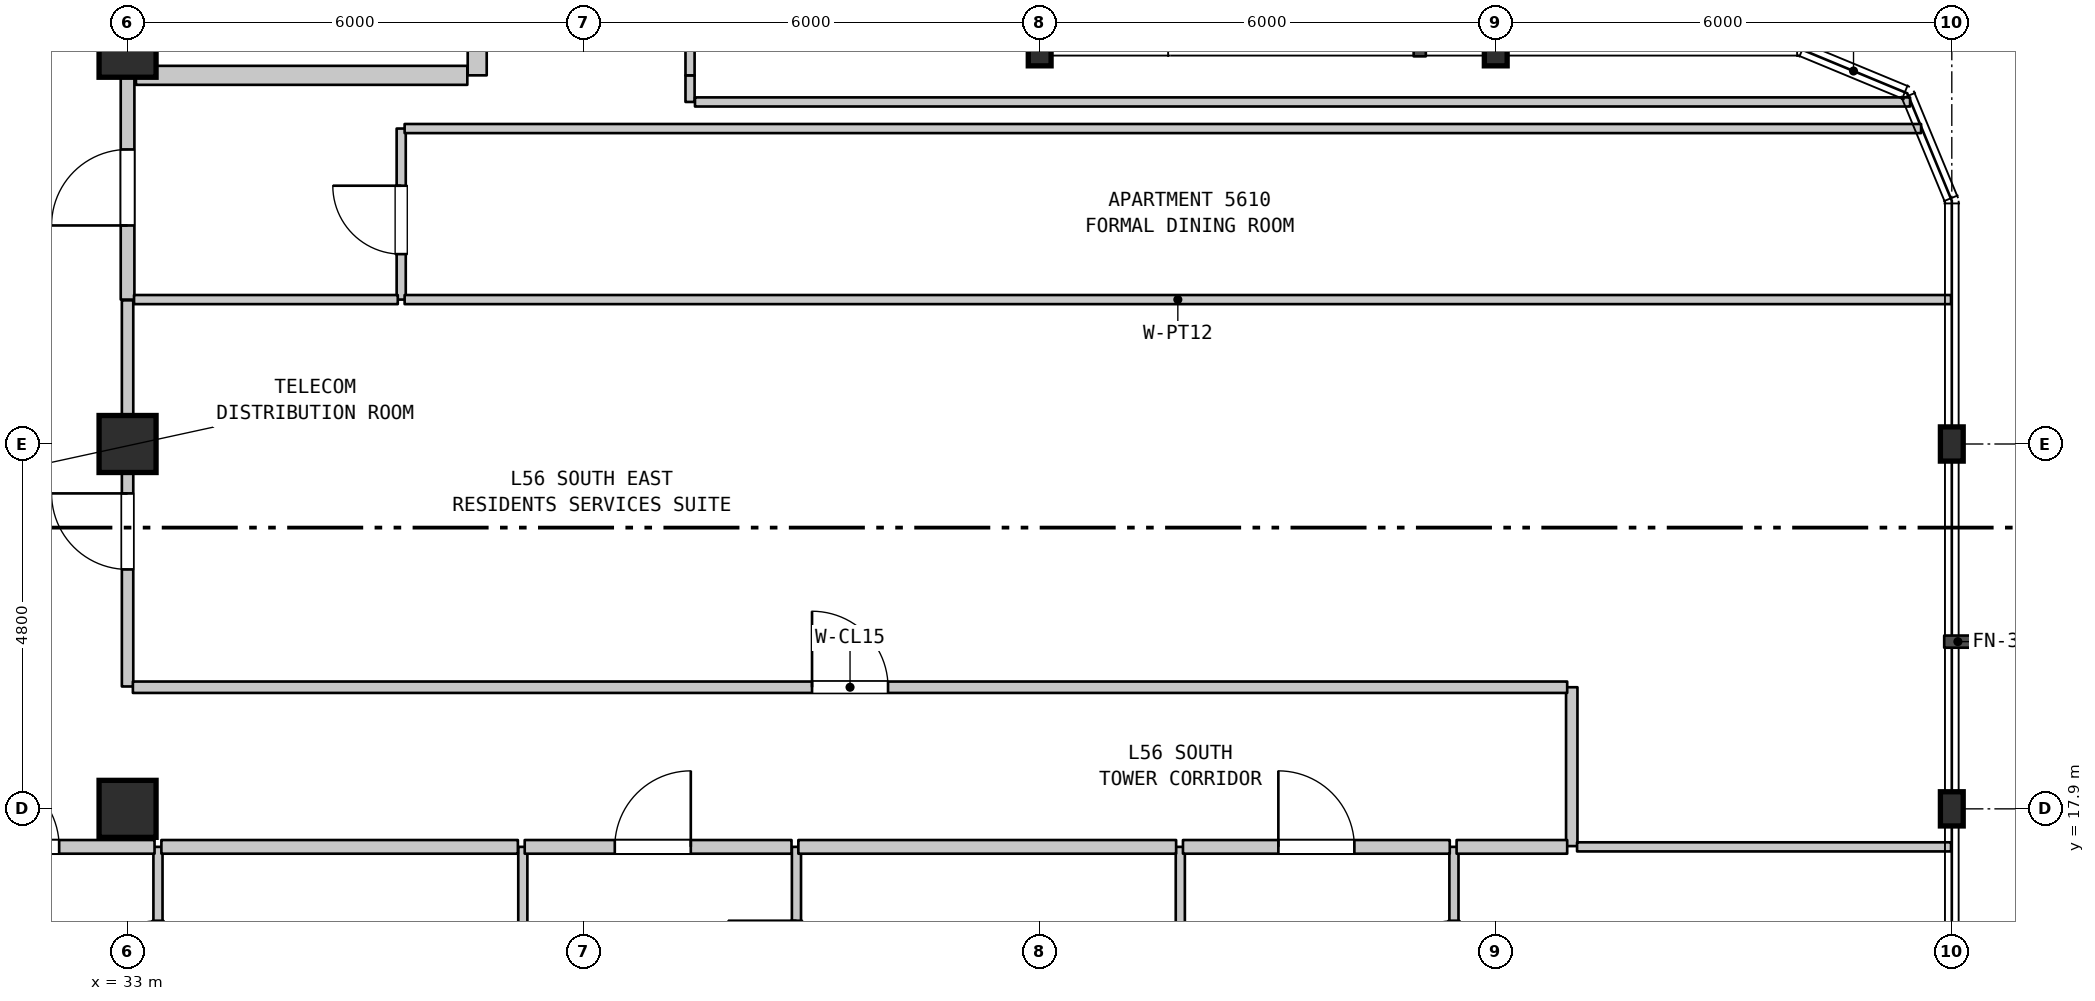
"""IFC4 building model, lengths in metres.
Left out: names, types, materials, properties, quantities, classifications, styles, units other than length and angle.
Written with IfcOpenShell. Run it as: python <this file> out.ifc"""

import sys

from ifc_helpers import new_model, si_unit, direction, frame, frame_2d, origin, origin_2d, place, context, subcontext, project, spatial, rectangle, i_section, extrude, element, fill, save


model = new_model("IFC4")
c1 = context("Model", 3, precision=1e-05, world=origin(), true_north=direction((0.0, 1.0)))
c2 = subcontext(c1, "Body", "Model", "MODEL_VIEW")
j1 = project(units=[si_unit("LENGTHUNIT", "METRE"), si_unit("PLANEANGLEUNIT", "RADIAN")], contexts=[c1])
p1 = place(None, origin())
s1 = spatial("IfcSite", under=j1, at=p1, CompositionType="ELEMENT")
p2 = place(p1, origin())
s2 = spatial("IfcBuilding", under=s1, at=p2, CompositionType="ELEMENT")
p3 = place(p2, frame((0.0, 0.0, 226.5)))
s3 = spatial("IfcBuildingStorey", under=s2, at=p3, CompositionType="ELEMENT", Elevation=226.5)
for number, where, z_axis, x_axis in (
    (1, (33.0, 17.9, 0.0), (0.0, 0.0, 1.0), (1.0, 0.0, 0.0)),
    (2, (33.0, 22.7, 0.0), (0.0, 0.0, 1.0), (1.0, 0.0, 0.0)),
    (3, (33.0, 27.9, 0.0), (0.0, 0.0, 1.0), (1.0, 0.0, 0.0)),
):
    element("IfcColumn", number, at=place(p3, frame(where, z_axis=z_axis, x_axis=x_axis)), inside=s3, PredefinedType="COLUMN", context=c2, shape_type="SweptSolid", body=[
        extrude(rectangle(XDim=0.75, YDim=0.75, at=origin_2d()), origin(), (0.0, 0.0, 1.0), 3.7),
    ])
for number, where, z_axis, x_axis in (
    (4, (45.0, 27.9, 0.0), (0.0, 0.0, 1.0), (1.0, 0.0, 0.0)),
    (5, (51.0, 27.9, 0.0), (0.0, 0.0, 1.0), (1.0, 0.0, 0.0)),
    (6, (57.0, 17.9, 0.0), (0.0, 0.0, 1.0), (1.0, 0.0, 0.0)),
    (7, (57.0, 22.7, 0.0), (0.0, 0.0, 1.0), (1.0, 0.0, 0.0)),
):
    element("IfcColumn", number, at=place(p3, frame(where, z_axis=z_axis, x_axis=x_axis)), inside=s3, PredefinedType="COLUMN", context=c2, shape_type="SweptSolid", body=[
        extrude(i_section(OverallWidth=0.3, OverallDepth=0.45, WebThickness=0.014, FlangeThickness=0.026, FilletRadius=0.027, at=origin_2d()), origin(), (0.0, 0.0, 1.0), 3.7),
    ])
p4 = place(p3, frame((33.0, 19.51, 0.0), z_axis=(0.0, 0.0, 1.0), x_axis=(0.0, 1.0, 0.0)))
e8 = element("IfcWall", 8, at=p4, inside=s3, PredefinedType="STANDARD", context=c2, shape_type="SweptSolid", body=[
    extrude(rectangle(XDim=5.08, YDim=0.15, at=frame_2d((2.54, 0.0))), origin(), (0.0, 0.0, 1.0), 2.99),
])
p5 = place(p4, frame((1.54, 0.0, 0.0)))
e9 = element("IfcOpeningElement", 9, at=p5, cuts=e8, PredefinedType="OPENING", context=c2, shape_type="SweptSolid", body=[
    extrude(rectangle(XDim=1.0, YDim=2.15, at=frame_2d((0.5, 1.075))), frame((0.0, 0.085, 0.0), z_axis=(0.0, -1.0, 0.0), x_axis=(1.0, 0.0, 0.0)), (0.0, 0.0, 1.0), 0.17),
])
p6 = place(p3, frame((33.0, 24.6, 0.0), z_axis=(0.0, 0.0, 1.0), x_axis=(0.0, 1.0, 0.0)))
e10 = element("IfcWall", 10, at=p6, inside=s3, PredefinedType="STANDARD", context=c2, shape_type="SweptSolid", body=[
    extrude(rectangle(XDim=2.95, YDim=0.18, at=frame_2d((1.475, 0.0))), origin(), (0.0, 0.0, 1.0), 2.99),
])
p7 = place(p6, frame((0.975, 0.0, 0.0)))
e11 = element("IfcOpeningElement", 11, at=p7, cuts=e10, PredefinedType="OPENING", context=c2, shape_type="SweptSolid", body=[
    extrude(rectangle(XDim=1.0, YDim=2.15, at=frame_2d((0.5, 1.075))), frame((0.0, 0.1, 0.0), z_axis=(0.0, -1.0, 0.0), x_axis=(1.0, 0.0, 0.0)), (0.0, 0.0, 1.0), 0.2),
])
p8 = place(p3, frame((33.0, 27.55, 0.0), z_axis=(0.0, 0.0, 1.0), x_axis=(0.0, 1.0, 0.0)))
e12 = element("IfcWall", 12, at=p8, inside=s3, PredefinedType="STANDARD", context=c2, shape_type="SweptSolid", body=[
    extrude(rectangle(XDim=4.636, YDim=0.25, at=frame_2d((2.318, 0.0))), origin(), (0.0, 0.0, 1.0), 2.89),
])
p9 = place(p3, frame((33.4, 14.7, 0.0), z_axis=(0.0, 0.0, 1.0), x_axis=(0.0, 1.0, 0.0)))
e13 = element("IfcWall", 13, at=p9, inside=s3, PredefinedType="PARTITIONING", context=c2, shape_type="SweptSolid", body=[
    extrude(rectangle(XDim=2.7, YDim=0.12, at=frame_2d((1.35, 0.0))), origin(), (0.0, 0.0, 1.0), 3.39),
])
p10 = place(p9, frame((0.828, 0.0, 0.0)))
e14 = element("IfcOpeningElement", 14, at=p10, cuts=e13, PredefinedType="OPENING", context=c2, shape_type="SweptSolid", body=[
    extrude(rectangle(XDim=0.9, YDim=2.1, at=frame_2d((0.45, 1.05))), frame((0.0, 0.07, 0.0), z_axis=(0.0, -1.0, 0.0), x_axis=(1.0, 0.0, 0.0)), (0.0, 0.0, 1.0), 0.14),
])
p11 = place(p3, frame((36.6, 24.6, 0.0), z_axis=(0.0, 0.0, 1.0), x_axis=(0.0, 1.0, 0.0)))
e15 = element("IfcWall", 15, at=p11, inside=s3, PredefinedType="PARTITIONING", context=c2, shape_type="SweptSolid", body=[
    extrude(rectangle(XDim=2.25, YDim=0.12, at=frame_2d((1.125, 0.0))), origin(), (0.0, 0.0, 1.0), 3.39),
])
p12 = place(p11, frame((0.598, 0.0, 0.0)))
e16 = element("IfcOpeningElement", 16, at=p12, cuts=e15, PredefinedType="OPENING", context=c2, shape_type="SweptSolid", body=[
    extrude(rectangle(XDim=0.9, YDim=2.15, at=frame_2d((0.45, 1.075))), frame((0.0, 0.07, 0.0), z_axis=(0.0, -1.0, 0.0), x_axis=(1.0, 0.0, 0.0)), (0.0, 0.0, 1.0), 0.14),
])
p13 = place(p3, frame((37.6, 27.55, 0.0), z_axis=(0.0, 0.0, 1.0), x_axis=(0.0, 1.0, 0.0)))
e17 = element("IfcWall", 17, at=p13, inside=s3, PredefinedType="STANDARD", context=c2, shape_type="SweptSolid", body=[
    extrude(rectangle(XDim=4.636, YDim=0.25, at=frame_2d((2.318, 0.0))), origin(), (0.0, 0.0, 1.0), 3.39),
])
p14 = place(p13, frame((1.843, 0.0, 0.0)))
e18 = element("IfcOpeningElement", 18, at=p14, cuts=e17, PredefinedType="OPENING", context=c2, shape_type="SweptSolid", body=[
    extrude(rectangle(XDim=0.95, YDim=2.15, at=frame_2d((0.475, 1.075))), frame((0.0, 0.135, 0.0), z_axis=(0.0, -1.0, 0.0), x_axis=(1.0, 0.0, 0.0)), (0.0, 0.0, 1.0), 0.27),
])
p15 = place(p3, frame((38.2, 14.7, 0.0), z_axis=(0.0, 0.0, 1.0), x_axis=(0.0, 1.0, 0.0)))
e19 = element("IfcWall", 19, at=p15, inside=s3, PredefinedType="PARTITIONING", context=c2, shape_type="SweptSolid", body=[
    extrude(rectangle(XDim=2.7, YDim=0.12, at=frame_2d((1.35, 0.0))), origin(), (0.0, 0.0, 1.0), 3.39),
])
p16 = place(p3, frame((40.4, 27.2, 0.0), z_axis=(0.0, 0.0, 1.0), x_axis=(0.0, 1.0, 0.0)))
e20 = element("IfcWall", 20, at=p16, inside=s3, PredefinedType="PARTITIONING", context=c2, shape_type="SweptSolid", body=[
    extrude(rectangle(XDim=0.35, YDim=0.12, at=frame_2d((0.175, 0.0))), origin(), (0.0, 0.0, 1.0), 3.39),
])
p17 = place(p3, frame((40.4, 27.55, 0.0), z_axis=(0.0, 0.0, 1.0), x_axis=(0.0, 1.0, 0.0)))
e21 = element("IfcWall", 21, at=p17, inside=s3, PredefinedType="PARTITIONING", context=c2, shape_type="SweptSolid", body=[
    extrude(rectangle(XDim=12.2, YDim=0.12, at=frame_2d((6.1, 0.0))), origin(), (0.0, 0.0, 1.0), 3.39),
])
p18 = place(p17, frame((1.758, 0.0, 0.0)))
e22 = element("IfcOpeningElement", 22, at=p18, cuts=e21, PredefinedType="OPENING", context=c2, shape_type="SweptSolid", body=[
    extrude(rectangle(XDim=0.9, YDim=2.15, at=frame_2d((0.45, 1.075))), frame((0.0, 0.07, 0.0), z_axis=(0.0, -1.0, 0.0), x_axis=(1.0, 0.0, 0.0)), (0.0, 0.0, 1.0), 0.14),
])
p19 = place(p17, frame((5.579, 0.0, 0.0)))
e23 = element("IfcOpeningElement", 23, at=p19, cuts=e21, PredefinedType="OPENING", context=c2, shape_type="SweptSolid", body=[
    extrude(rectangle(XDim=0.9, YDim=2.15, at=frame_2d((0.45, 1.075))), frame((0.0, 0.07, 0.0), z_axis=(0.0, -1.0, 0.0), x_axis=(1.0, 0.0, 0.0)), (0.0, 0.0, 1.0), 0.14),
])
p20 = place(p17, frame((9.541, 0.0, 0.0)))
e24 = element("IfcOpeningElement", 24, at=p20, cuts=e21, PredefinedType="OPENING", context=c2, shape_type="SweptSolid", body=[
    extrude(rectangle(XDim=0.9, YDim=2.15, at=frame_2d((0.45, 1.075))), frame((0.0, 0.07, 0.0), z_axis=(0.0, -1.0, 0.0), x_axis=(1.0, 0.0, 0.0)), (0.0, 0.0, 1.0), 0.14),
])
p21 = place(p3, frame((41.8, 14.7, 0.0), z_axis=(0.0, 0.0, 1.0), x_axis=(0.0, 1.0, 0.0)))
e25 = element("IfcWall", 25, at=p21, inside=s3, PredefinedType="PARTITIONING", context=c2, shape_type="SweptSolid", body=[
    extrude(rectangle(XDim=2.7, YDim=0.12, at=frame_2d((1.35, 0.0))), origin(), (0.0, 0.0, 1.0), 3.39),
])
p22 = place(p21, frame((0.828, 0.0, 0.0)))
e26 = element("IfcOpeningElement", 26, at=p22, cuts=e25, PredefinedType="OPENING", context=c2, shape_type="SweptSolid", body=[
    extrude(rectangle(XDim=0.9, YDim=2.1, at=frame_2d((0.45, 1.05))), frame((0.0, 0.07, 0.0), z_axis=(0.0, -1.0, 0.0), x_axis=(1.0, 0.0, 0.0)), (0.0, 0.0, 1.0), 0.14),
])
p23 = place(p3, frame((46.85, 14.7, 0.0), z_axis=(0.0, 0.0, 1.0), x_axis=(0.0, 1.0, 0.0)))
e27 = element("IfcWall", 27, at=p23, inside=s3, PredefinedType="PARTITIONING", context=c2, shape_type="SweptSolid", body=[
    extrude(rectangle(XDim=2.7, YDim=0.12, at=frame_2d((1.35, 0.0))), origin(), (0.0, 0.0, 1.0), 3.39),
])
p24 = place(p3, frame((50.45, 14.7, 0.0), z_axis=(0.0, 0.0, 1.0), x_axis=(0.0, 1.0, 0.0)))
e28 = element("IfcWall", 28, at=p24, inside=s3, PredefinedType="PARTITIONING", context=c2, shape_type="SweptSolid", body=[
    extrude(rectangle(XDim=2.7, YDim=0.12, at=frame_2d((1.35, 0.0))), origin(), (0.0, 0.0, 1.0), 3.39),
])
p25 = place(p24, frame((0.828, 0.0, 0.0)))
e29 = element("IfcOpeningElement", 29, at=p25, cuts=e28, PredefinedType="OPENING", context=c2, shape_type="SweptSolid", body=[
    extrude(rectangle(XDim=0.9, YDim=2.1, at=frame_2d((0.45, 1.05))), frame((0.0, 0.07, 0.0), z_axis=(0.0, -1.0, 0.0), x_axis=(1.0, 0.0, 0.0)), (0.0, 0.0, 1.0), 0.14),
])
p26 = place(p3, frame((52.0, 17.41, 0.0), z_axis=(0.0, 0.0, 1.0), x_axis=(0.0, 1.0, 0.0)))
e30 = element("IfcWall", 30, at=p26, inside=s3, PredefinedType="STANDARD", context=c2, shape_type="SweptSolid", body=[
    extrude(rectangle(XDim=2.09, YDim=0.15, at=frame_2d((1.045, 0.0))), origin(), (0.0, 0.0, 1.0), 3.39),
])
p27 = place(p3, frame((29.845, 17.4, 0.0), z_axis=(0.0, 0.0, 1.0), x_axis=(1.0, 0.0, 0.0)))
e31 = element("IfcWall", 31, at=p27, inside=s3, PredefinedType="STANDARD", context=c2, shape_type="SweptSolid", body=[
    extrude(rectangle(XDim=3.51, YDim=0.18, at=frame_2d((1.755, 0.0))), origin(), (0.0, 0.0, 1.0), 3.39),
])
p28 = place(p27, frame((1.255, 0.0, 0.0)))
e32 = element("IfcOpeningElement", 32, at=p28, cuts=e31, PredefinedType="OPENING", context=c2, shape_type="SweptSolid", body=[
    extrude(rectangle(XDim=1.0, YDim=2.15, at=frame_2d((0.5, 1.075))), frame((0.0, 0.1, 0.0), z_axis=(0.0, -1.0, 0.0), x_axis=(1.0, 0.0, 0.0)), (0.0, 0.0, 1.0), 0.2),
])
p29 = place(p3, frame((33.445, 17.4, 0.0), z_axis=(0.0, 0.0, 1.0), x_axis=(1.0, 0.0, 0.0)))
e33 = element("IfcWall", 33, at=p29, inside=s3, PredefinedType="STANDARD", context=c2, shape_type="SweptSolid", body=[
    extrude(rectangle(XDim=4.69, YDim=0.18, at=frame_2d((2.345, 0.0))), origin(), (0.0, 0.0, 1.0), 3.39),
])
p30 = place(p3, frame((38.225, 17.4, 0.0), z_axis=(0.0, 0.0, 1.0), x_axis=(1.0, 0.0, 0.0)))
e34 = element("IfcWall", 34, at=p30, inside=s3, PredefinedType="STANDARD", context=c2, shape_type="SweptSolid", body=[
    extrude(rectangle(XDim=3.51, YDim=0.18, at=frame_2d((1.755, 0.0))), origin(), (0.0, 0.0, 1.0), 3.39),
])
p31 = place(p30, frame((1.185, 0.0, 0.0)))
e35 = element("IfcOpeningElement", 35, at=p31, cuts=e34, PredefinedType="OPENING", context=c2, shape_type="SweptSolid", body=[
    extrude(rectangle(XDim=1.0, YDim=2.15, at=frame_2d((0.5, 1.075))), frame((0.0, 0.1, 0.0), z_axis=(0.0, -1.0, 0.0), x_axis=(1.0, 0.0, 0.0)), (0.0, 0.0, 1.0), 0.2),
])
p32 = place(p3, frame((41.825, 17.4, 0.0), z_axis=(0.0, 0.0, 1.0), x_axis=(1.0, 0.0, 0.0)))
e36 = element("IfcWall", 36, at=p32, inside=s3, PredefinedType="STANDARD", context=c2, shape_type="SweptSolid", body=[
    extrude(rectangle(XDim=4.97, YDim=0.18, at=frame_2d((2.485, 0.0))), origin(), (0.0, 0.0, 1.0), 3.39),
])
p33 = place(p3, frame((46.885, 17.4, 0.0), z_axis=(0.0, 0.0, 1.0), x_axis=(1.0, 0.0, 0.0)))
e37 = element("IfcWall", 37, at=p33, inside=s3, PredefinedType="STANDARD", context=c2, shape_type="SweptSolid", body=[
    extrude(rectangle(XDim=3.51, YDim=0.18, at=frame_2d((1.755, 0.0))), origin(), (0.0, 0.0, 1.0), 3.39),
])
p34 = place(p33, frame((1.255, 0.0, 0.0)))
e38 = element("IfcOpeningElement", 38, at=p34, cuts=e37, PredefinedType="OPENING", context=c2, shape_type="SweptSolid", body=[
    extrude(rectangle(XDim=1.0, YDim=2.15, at=frame_2d((0.5, 1.075))), frame((0.0, 0.1, 0.0), z_axis=(0.0, -1.0, 0.0), x_axis=(1.0, 0.0, 0.0)), (0.0, 0.0, 1.0), 0.2),
])
p35 = place(p3, frame((50.485, 17.4, 0.0), z_axis=(0.0, 0.0, 1.0), x_axis=(1.0, 0.0, 0.0)))
e39 = element("IfcWall", 39, at=p35, inside=s3, PredefinedType="STANDARD", context=c2, shape_type="SweptSolid", body=[
    extrude(rectangle(XDim=1.455, YDim=0.18, at=frame_2d((0.728, 0.0))), origin(), (0.0, 0.0, 1.0), 3.39),
])
p36 = place(p3, frame((52.07, 17.4, 0.0), z_axis=(0.0, 0.0, 1.0), x_axis=(1.0, 0.0, 0.0)))
e40 = element("IfcWall", 40, at=p36, inside=s3, PredefinedType="PARTITIONING", context=c2, shape_type="SweptSolid", body=[
    extrude(rectangle(XDim=4.92, YDim=0.12, at=frame_2d((2.46, 0.0))), origin(), (0.0, 0.0, 1.0), 3.39),
])
p37 = place(p3, frame((33.07, 19.5, 0.0), z_axis=(0.0, 0.0, 1.0), x_axis=(1.0, 0.0, 0.0)))
e41 = element("IfcWall", 41, at=p37, inside=s3, PredefinedType="STANDARD", context=c2, shape_type="SweptSolid", body=[
    extrude(rectangle(XDim=18.87, YDim=0.15, at=frame_2d((9.435, 0.0))), origin(), (0.0, 0.0, 1.0), 3.39),
])
p38 = place(p37, frame((8.935, 0.0, 0.0)))
e42 = element("IfcOpeningElement", 42, at=p38, cuts=e41, PredefinedType="OPENING", context=c2, shape_type="SweptSolid", body=[
    extrude(rectangle(XDim=1.0, YDim=2.15, at=frame_2d((0.5, 1.075))), frame((0.0, 0.085, 0.0), z_axis=(0.0, -1.0, 0.0), x_axis=(1.0, 0.0, 0.0)), (0.0, 0.0, 1.0), 0.17),
])
p39 = place(p3, frame((33.085, 24.6, 0.0), z_axis=(0.0, 0.0, 1.0), x_axis=(1.0, 0.0, 0.0)))
e43 = element("IfcWall", 43, at=p39, inside=s3, PredefinedType="PARTITIONING", context=c2, shape_type="SweptSolid", body=[
    extrude(rectangle(XDim=3.47, YDim=0.12, at=frame_2d((1.735, 0.0))), origin(), (0.0, 0.0, 1.0), 3.39),
])
p40 = place(p3, frame((36.645, 24.6, 0.0), z_axis=(0.0, 0.0, 1.0), x_axis=(1.0, 0.0, 0.0)))
e44 = element("IfcWall", 44, at=p40, inside=s3, PredefinedType="PARTITIONING", context=c2, shape_type="SweptSolid", body=[
    extrude(rectangle(XDim=20.345, YDim=0.12, at=frame_2d((10.172, 0.0))), origin(), (0.0, 0.0, 1.0), 3.39),
])
p41 = place(p3, frame((36.645, 26.85, 0.0), z_axis=(0.0, 0.0, 1.0), x_axis=(1.0, 0.0, 0.0)))
e45 = element("IfcWall", 45, at=p41, inside=s3, PredefinedType="PARTITIONING", context=c2, shape_type="SweptSolid", body=[
    extrude(rectangle(XDim=19.951, YDim=0.12, at=frame_2d((9.976, 0.0))), origin(), (0.0, 0.0, 1.0), 3.39),
])
p42 = place(p3, frame((40.465, 27.2, 0.0), z_axis=(0.0, 0.0, 1.0), x_axis=(1.0, 0.0, 0.0)))
e46 = element("IfcWall", 46, at=p42, inside=s3, PredefinedType="PARTITIONING", context=c2, shape_type="SweptSolid", body=[
    extrude(rectangle(XDim=15.986, YDim=0.12, at=frame_2d((7.993, 0.0))), origin(), (0.0, 0.0, 1.0), 3.39),
])
p43 = place(p3, frame((33.11, 27.55, 0.0), z_axis=(0.0, 0.0, 1.0), x_axis=(1.0, 0.0, 0.0)))
e47 = element("IfcWall", 47, at=p43, inside=s3, PredefinedType="STANDARD", context=c2, shape_type="SweptSolid", body=[
    extrude(rectangle(XDim=4.36, YDim=0.25, at=frame_2d((2.18, 0.0))), origin(), (0.0, 0.0, 1.0), 3.39),
])
p44 = place(p5, origin())
e48 = element("IfcDoor", 48, at=p44, inside=s3, OperationType="SINGLE_SWING_RIGHT", PredefinedType="DOOR", context=c2, shape_type="SweptSolid", body=[
    extrude(rectangle(XDim=1.0, YDim=2.15, at=frame_2d((0.5, 1.075))), frame((0.0, 0.025, 0.0), z_axis=(0.0, -1.0, 0.0), x_axis=(1.0, 0.0, 0.0)), (0.0, 0.0, 1.0), 0.05),
])
fill(e9, e48)
p45 = place(p7, origin())
e49 = element("IfcDoor", 49, at=p45, inside=s3, OperationType="SINGLE_SWING_LEFT", PredefinedType="DOOR", context=c2, shape_type="SweptSolid", body=[
    extrude(rectangle(XDim=1.0, YDim=2.15, at=frame_2d((0.5, 1.075))), frame((0.0, 0.025, 0.0), z_axis=(0.0, -1.0, 0.0), x_axis=(1.0, 0.0, 0.0)), (0.0, 0.0, 1.0), 0.05),
])
fill(e11, e49)
p46 = place(p10, origin())
e50 = element("IfcDoor", 50, at=p46, inside=s3, OperationType="SINGLE_SWING_LEFT", PredefinedType="DOOR", context=c2, shape_type="SweptSolid", body=[
    extrude(rectangle(XDim=0.9, YDim=2.1, at=frame_2d((0.45, 1.05))), frame((0.0, 0.025, 0.0), z_axis=(0.0, -1.0, 0.0), x_axis=(1.0, 0.0, 0.0)), (0.0, 0.0, 1.0), 0.05),
])
fill(e14, e50)
p47 = place(p12, origin())
e51 = element("IfcDoor", 51, at=p47, inside=s3, OperationType="SINGLE_SWING_RIGHT", PredefinedType="DOOR", context=c2, shape_type="SweptSolid", body=[
    extrude(rectangle(XDim=0.9, YDim=2.15, at=frame_2d((0.45, 1.075))), frame((0.0, 0.025, 0.0), z_axis=(0.0, -1.0, 0.0), x_axis=(1.0, 0.0, 0.0)), (0.0, 0.0, 1.0), 0.05),
])
fill(e16, e51)
p48 = place(p22, origin())
e52 = element("IfcDoor", 52, at=p48, inside=s3, OperationType="SINGLE_SWING_RIGHT", PredefinedType="DOOR", context=c2, shape_type="SweptSolid", body=[
    extrude(rectangle(XDim=0.9, YDim=2.1, at=frame_2d((0.45, 1.05))), frame((0.0, 0.025, 0.0), z_axis=(0.0, -1.0, 0.0), x_axis=(1.0, 0.0, 0.0)), (0.0, 0.0, 1.0), 0.05),
])
fill(e26, e52)
p49 = place(p25, origin())
e53 = element("IfcDoor", 53, at=p49, inside=s3, OperationType="SINGLE_SWING_LEFT", PredefinedType="DOOR", context=c2, shape_type="SweptSolid", body=[
    extrude(rectangle(XDim=0.9, YDim=2.1, at=frame_2d((0.45, 1.05))), frame((0.0, 0.025, 0.0), z_axis=(0.0, -1.0, 0.0), x_axis=(1.0, 0.0, 0.0)), (0.0, 0.0, 1.0), 0.05),
])
fill(e29, e53)
p50 = place(p28, origin())
e54 = element("IfcDoor", 54, at=p50, inside=s3, OperationType="SINGLE_SWING_LEFT", PredefinedType="DOOR", context=c2, shape_type="SweptSolid", body=[
    extrude(rectangle(XDim=1.0, YDim=2.15, at=frame_2d((0.5, 1.075))), frame((0.0, 0.025, 0.0), z_axis=(0.0, -1.0, 0.0), x_axis=(1.0, 0.0, 0.0)), (0.0, 0.0, 1.0), 0.05),
])
fill(e32, e54)
p51 = place(p31, origin())
e55 = element("IfcDoor", 55, at=p51, inside=s3, OperationType="SINGLE_SWING_RIGHT", PredefinedType="DOOR", context=c2, shape_type="SweptSolid", body=[
    extrude(rectangle(XDim=1.0, YDim=2.15, at=frame_2d((0.5, 1.075))), frame((0.0, 0.025, 0.0), z_axis=(0.0, -1.0, 0.0), x_axis=(1.0, 0.0, 0.0)), (0.0, 0.0, 1.0), 0.05),
])
fill(e35, e55)
p52 = place(p34, origin())
e56 = element("IfcDoor", 56, at=p52, inside=s3, OperationType="SINGLE_SWING_LEFT", PredefinedType="DOOR", context=c2, shape_type="SweptSolid", body=[
    extrude(rectangle(XDim=1.0, YDim=2.15, at=frame_2d((0.5, 1.075))), frame((0.0, 0.025, 0.0), z_axis=(0.0, -1.0, 0.0), x_axis=(1.0, 0.0, 0.0)), (0.0, 0.0, 1.0), 0.05),
])
fill(e38, e56)
p53 = place(p38, origin())
e57 = element("IfcDoor", 57, at=p53, inside=s3, OperationType="SINGLE_SWING_LEFT", PredefinedType="DOOR", context=c2, shape_type="SweptSolid", body=[
    extrude(rectangle(XDim=1.0, YDim=2.15, at=frame_2d((0.5, 1.075))), frame((0.0, 0.025, 0.0), z_axis=(0.0, -1.0, 0.0), x_axis=(1.0, 0.0, 0.0)), (0.0, 0.0, 1.0), 0.05),
])
fill(e42, e57)
save(model, sys.argv[1])
